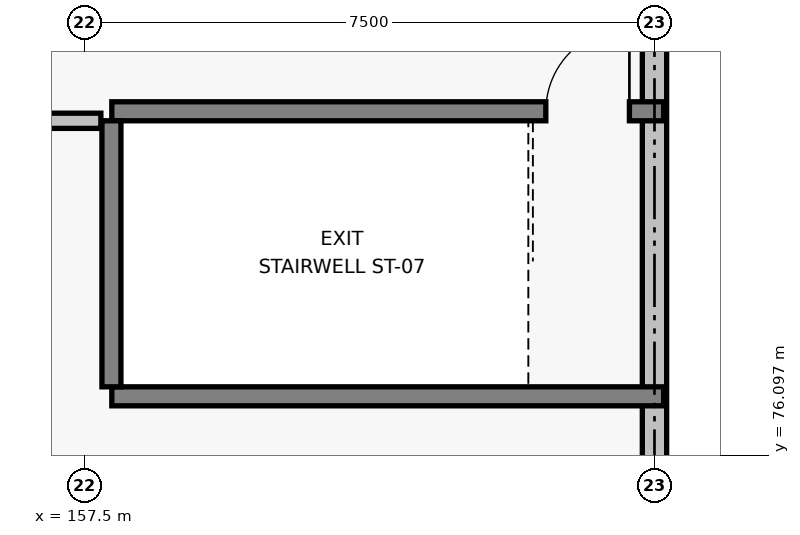
"""IFC4 building model, lengths in metres.
Left out: names, types, materials, properties, quantities, classifications, styles, units other than length and angle.
Written with IfcOpenShell. Run it as: python <this file> out.ifc"""

import sys

from ifc_helpers import new_model, si_unit, direction, frame, frame_2d, origin, place, context, subcontext, project, spatial, rectangle, extrude, element, fill, save


model = new_model("IFC4")
c1 = context("Model", 3, precision=1e-05, world=origin(), true_north=direction((0.0, 1.0)))
c2 = subcontext(c1, "Body", "Model", "MODEL_VIEW")
j1 = project(units=[si_unit("LENGTHUNIT", "METRE"), si_unit("PLANEANGLEUNIT", "RADIAN")], contexts=[c1])
p1 = place(None, origin())
s1 = spatial("IfcSite", under=j1, at=p1, CompositionType="ELEMENT")
p2 = place(p1, origin())
s2 = spatial("IfcBuilding", under=s1, at=p2, CompositionType="ELEMENT")
p3 = place(p2, frame((0.0, 0.0, 13.2)))
s3 = spatial("IfcBuildingStorey", under=s2, at=p3, CompositionType="ELEMENT", Elevation=13.2)
p4 = place(p3, frame((165.0, 75.285, 0.0), z_axis=(0.0, 0.0, 1.0), x_axis=(0.0, 1.0, 0.0)))
e1 = element("IfcWall", 1, at=p4, inside=s3, PredefinedType="SOLIDWALL", context=c2, shape_type="SweptSolid", body=[
    extrude(rectangle(XDim=6.93, YDim=0.32, at=frame_2d((3.465, 0.0))), origin(), (0.0, 0.0, 1.0), 2.79),
])
p5 = place(p3, frame((157.86, 76.875, 0.0), z_axis=(0.0, 0.0, 1.0), x_axis=(1.0, 0.0, 0.0)))
e2 = element("IfcWall", 2, at=p5, inside=s3, PredefinedType="SOLIDWALL", context=c2, shape_type="SweptSolid", body=[
    extrude(rectangle(XDim=7.26, YDim=0.25, at=frame_2d((3.63, 0.0))), origin(), (0.0, 0.0, 1.0), 3.62),
])
p6 = place(p3, frame((157.86, 80.625, 0.0), z_axis=(0.0, 0.0, 1.0), x_axis=(1.0, 0.0, 0.0)))
e3 = element("IfcWall", 3, at=p6, inside=s3, PredefinedType="SOLIDWALL", context=c2, shape_type="SweptSolid", body=[
    extrude(rectangle(XDim=7.26, YDim=0.25, at=frame_2d((3.63, 0.0))), origin(), (0.0, 0.0, 1.0), 3.62),
])
p7 = place(p6, frame((5.71, 0.0, 0.0)))
e4 = element("IfcOpeningElement", 4, at=p7, cuts=e3, PredefinedType="OPENING", context=c2, shape_type="SweptSolid", body=[
    extrude(rectangle(XDim=1.1, YDim=2.15, at=frame_2d((0.55, 1.075))), frame((0.0, 0.135, 0.0), z_axis=(0.0, -1.0, 0.0), x_axis=(1.0, 0.0, 0.0)), (0.0, 0.0, 1.0), 0.27),
])
p8 = place(p3, frame((157.855, 77.0, 0.0), z_axis=(0.0, 0.0, 1.0), x_axis=(0.0, 1.0, 0.0)))
e5 = element("IfcWall", 5, at=p8, inside=s3, PredefinedType="SOLIDWALL", context=c2, shape_type="SweptSolid", body=[
    extrude(rectangle(XDim=3.5, YDim=0.25, at=frame_2d((1.75, 0.0))), origin(), (0.0, 0.0, 1.0), 3.62),
])
p9 = place(p3, frame((154.5, 80.5, 0.0), z_axis=(0.0, 0.0, 1.0), x_axis=(1.0, 0.0, 0.0)))
e6 = element("IfcWall", 6, at=p9, inside=s3, PredefinedType="PARTITIONING", context=c2, shape_type="SweptSolid", body=[
    extrude(rectangle(XDim=3.216, YDim=0.2, at=frame_2d((1.608, 0.0))), origin(), (0.0, 0.0, 1.0), 2.97),
])
p10 = place(p7, origin())
e7 = element("IfcDoor", 7, at=p10, inside=s3, OperationType="SINGLE_SWING_RIGHT", PredefinedType="DOOR", context=c2, shape_type="SweptSolid", body=[
    extrude(rectangle(XDim=1.1, YDim=2.15, at=frame_2d((0.55, 1.075))), frame((0.0, 0.025, 0.0), z_axis=(0.0, -1.0, 0.0), x_axis=(1.0, 0.0, 0.0)), (0.0, 0.0, 1.0), 0.05),
])
fill(e4, e7)
save(model, sys.argv[1])
